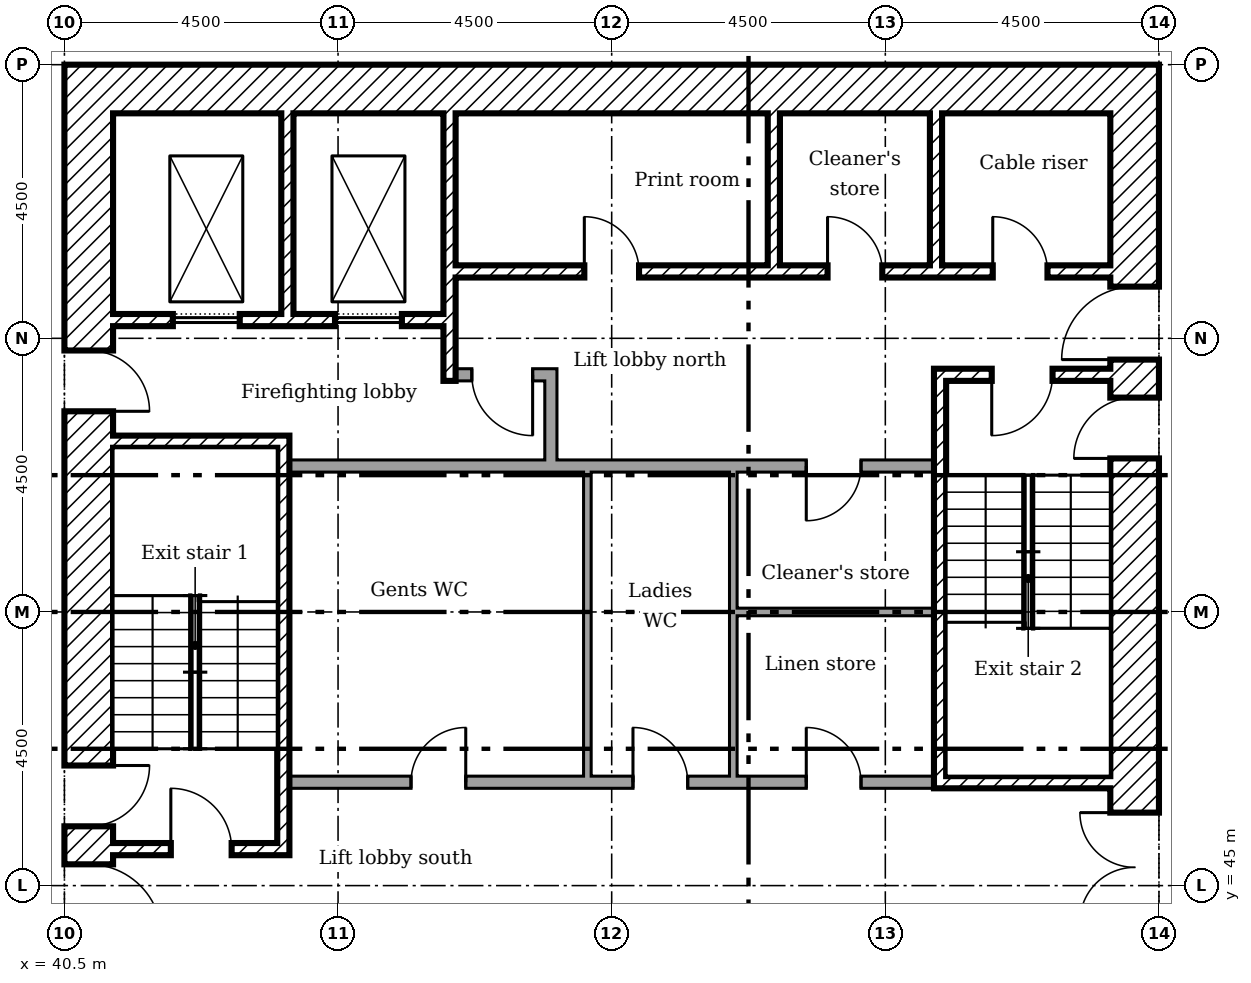
"""IFC4 building model, lengths in metres.
Left out: names, types, materials, properties, quantities, classifications, styles, units other than length and angle.
Written with IfcOpenShell. Run it as: python <this file> out.ifc"""

import sys

from ifc_helpers import new_model, si_unit, direction, frame, frame_2d, origin, place, context, subcontext, project, spatial, rectangle, extrude, element, fill, save


model = new_model("IFC4")
c1 = context("Model", 3, precision=1e-05, world=origin(), true_north=direction((0.0, 1.0)))
c2 = subcontext(c1, "Body", "Model", "MODEL_VIEW")
j1 = project(units=[si_unit("LENGTHUNIT", "METRE"), si_unit("PLANEANGLEUNIT", "RADIAN")], contexts=[c1])
p1 = place(None, origin())
s1 = spatial("IfcSite", under=j1, at=p1, CompositionType="ELEMENT")
p2 = place(p1, origin())
s2 = spatial("IfcBuilding", under=s1, at=p2, CompositionType="ELEMENT")
p3 = place(p2, frame((0.0, 0.0, 58.2)))
s3 = spatial("IfcBuildingStorey", under=s2, at=p3, CompositionType="ELEMENT", Elevation=58.2)
p4 = place(p3, frame((58.1, 40.5, 0.0), z_axis=(0.0, 0.0, 1.0), x_axis=(0.0, 1.0, 0.0)))
e1 = element("IfcWall", 1, at=p4, inside=s3, PredefinedType="SHEAR", context=c2, shape_type="SweptSolid", body=[
    extrude(rectangle(XDim=18.0, YDim=0.8, at=frame_2d((9.0, 0.0))), origin(), (0.0, 0.0, 1.0), 3.35),
])
p5 = place(p4, frame((13.15, 0.0, 0.0)))
e2 = element("IfcOpeningElement", 2, at=p5, cuts=e1, PredefinedType="OPENING", context=c2, shape_type="SweptSolid", body=[
    extrude(rectangle(XDim=1.2, YDim=2.1, at=frame_2d((0.6, 1.05))), frame((0.0, 0.41, 0.0), z_axis=(0.0, -1.0, 0.0), x_axis=(1.0, 0.0, 0.0)), (0.0, 0.0, 1.0), 0.82),
])
p6 = place(p4, frame((3.9, 0.0, 0.0)))
e3 = element("IfcOpeningElement", 3, at=p6, cuts=e1, PredefinedType="OPENING", context=c2, shape_type="SweptSolid", body=[
    extrude(rectangle(XDim=1.8, YDim=2.1, at=frame_2d((0.9, 1.05))), frame((0.0, 0.41, 0.0), z_axis=(0.0, -1.0, 0.0), x_axis=(1.0, 0.0, 0.0)), (0.0, 0.0, 1.0), 0.82),
])
p7 = place(p4, frame((11.525, 0.0, 0.0)))
e4 = element("IfcOpeningElement", 4, at=p7, cuts=e1, PredefinedType="OPENING", context=c2, shape_type="SweptSolid", body=[
    extrude(rectangle(XDim=1.0, YDim=2.1, at=frame_2d((0.5, 1.05))), frame((0.0, 0.41, 0.0), z_axis=(0.0, -1.0, 0.0), x_axis=(1.0, 0.0, 0.0)), (0.0, 0.0, 1.0), 0.82),
])
p8 = place(p3, frame((41.3, 58.1, 0.0)))
e5 = element("IfcWall", 5, at=p8, inside=s3, PredefinedType="SHEAR", context=c2, shape_type="SweptSolid", body=[
    extrude(rectangle(XDim=16.4, YDim=0.8, at=frame_2d((8.2, 0.0))), origin(), (0.0, 0.0, 1.0), 3.35),
])
p9 = place(p3, frame((40.9, 40.5, 0.0), z_axis=(0.0, 0.0, 1.0), x_axis=(0.0, 1.0, 0.0)))
e6 = element("IfcWall", 6, at=p9, inside=s3, PredefinedType="SHEAR", context=c2, shape_type="SweptSolid", body=[
    extrude(rectangle(XDim=18.0, YDim=0.8, at=frame_2d((9.0, 0.0))), origin(), (0.0, 0.0, 1.0), 3.35),
])
p10 = place(p9, frame((3.65, 0.0, 0.0)))
e7 = element("IfcOpeningElement", 7, at=p10, cuts=e6, PredefinedType="OPENING", context=c2, shape_type="SweptSolid", body=[
    extrude(rectangle(XDim=1.2, YDim=2.1, at=frame_2d((0.6, 1.05))), frame((0.0, 0.41, 0.0), z_axis=(0.0, -1.0, 0.0), x_axis=(1.0, 0.0, 0.0)), (0.0, 0.0, 1.0), 0.82),
])
p11 = place(p9, frame((5.475, 0.0, 0.0)))
e8 = element("IfcOpeningElement", 8, at=p11, cuts=e6, PredefinedType="OPENING", context=c2, shape_type="SweptSolid", body=[
    extrude(rectangle(XDim=1.0, YDim=2.1, at=frame_2d((0.5, 1.05))), frame((0.0, 0.41, 0.0), z_axis=(0.0, -1.0, 0.0), x_axis=(1.0, 0.0, 0.0)), (0.0, 0.0, 1.0), 0.82),
])
p12 = place(p9, frame((12.3, 0.0, 0.0)))
e9 = element("IfcOpeningElement", 9, at=p12, cuts=e6, PredefinedType="OPENING", context=c2, shape_type="SweptSolid", body=[
    extrude(rectangle(XDim=1.0, YDim=2.1, at=frame_2d((0.5, 1.05))), frame((0.0, 0.41, 0.0), z_axis=(0.0, -1.0, 0.0), x_axis=(1.0, 0.0, 0.0)), (0.0, 0.0, 1.0), 0.82),
])
p13 = place(p3, frame((44.167, 57.7, 0.0), z_axis=(0.0, 0.0, 1.0), x_axis=(0.0, -1.0, 0.0)))
e10 = element("IfcWall", 10, at=p13, inside=s3, PredefinedType="SHEAR", context=c2, shape_type="SweptSolid", body=[
    extrude(rectangle(XDim=3.3, YDim=0.2, at=frame_2d((1.65, 0.0))), origin(), (0.0, 0.0, 1.0), 3.35),
])
p14 = place(p3, frame((46.833, 57.7, 0.0), z_axis=(0.0, 0.0, 1.0), x_axis=(0.0, -1.0, 0.0)))
e11 = element("IfcWall", 11, at=p14, inside=s3, PredefinedType="SHEAR", context=c2, shape_type="SweptSolid", body=[
    extrude(rectangle(XDim=4.4, YDim=0.2, at=frame_2d((2.2, 0.0))), origin(), (0.0, 0.0, 1.0), 3.35),
])
for number, where, z_axis, x_axis in (
    (12, (52.167, 57.7, 0.0), (0.0, 0.0, 1.0), (0.0, -1.0, 0.0)),
    (13, (54.833, 57.7, 0.0), (0.0, 0.0, 1.0), (0.0, -1.0, 0.0)),
):
    element("IfcWall", number, at=place(p3, frame(where, z_axis=z_axis, x_axis=x_axis)), inside=s3, PredefinedType="SHEAR", context=c2, shape_type="SweptSolid", body=[
        extrude(rectangle(XDim=2.5, YDim=0.2, at=frame_2d((1.25, 0.0))), origin(), (0.0, 0.0, 1.0), 3.35),
    ])
p15 = place(p3, frame((48.5, 51.9, 0.0), z_axis=(0.0, 0.0, 1.0), x_axis=(0.0, 1.0, 0.0)))
e14 = element("IfcWall", 14, at=p15, inside=s3, PredefinedType="PARTITIONING", context=c2, shape_type="SweptSolid", body=[
    extrude(rectangle(XDim=1.6, YDim=0.2, at=frame_2d((0.8, 0.0))), origin(), (0.0, 0.0, 1.0), 3.35),
])
p16 = place(p3, frame((46.933, 53.4, 0.0)))
e15 = element("IfcWall", 15, at=p16, inside=s3, PredefinedType="PARTITIONING", context=c2, shape_type="SweptSolid", body=[
    extrude(rectangle(XDim=1.467, YDim=0.2, at=frame_2d((0.733, 0.0))), origin(), (0.0, 0.0, 1.0), 3.35),
])
p17 = place(p16, frame((0.267, 0.0, 0.0)))
e16 = element("IfcOpeningElement", 16, at=p17, cuts=e15, PredefinedType="OPENING", context=c2, shape_type="SweptSolid", body=[
    extrude(rectangle(XDim=1.0, YDim=2.1, at=frame_2d((0.5, 1.05))), frame((0.0, 0.11, 0.0), z_axis=(0.0, -1.0, 0.0), x_axis=(1.0, 0.0, 0.0)), (0.0, 0.0, 1.0), 0.22),
])
p18 = place(p3, frame((46.933, 55.1, 0.0)))
e17 = element("IfcWall", 17, at=p18, inside=s3, PredefinedType="SHEAR", context=c2, shape_type="SweptSolid", body=[
    extrude(rectangle(XDim=10.767, YDim=0.2, at=frame_2d((5.383, 0.0))), origin(), (0.0, 0.0, 1.0), 3.35),
])
p19 = place(p18, frame((8.833, 0.0, 0.0)))
e18 = element("IfcOpeningElement", 18, at=p19, cuts=e17, PredefinedType="OPENING", context=c2, shape_type="SweptSolid", body=[
    extrude(rectangle(XDim=0.9, YDim=2.1, at=frame_2d((0.45, 1.05))), frame((0.0, 0.11, 0.0), z_axis=(0.0, -1.0, 0.0), x_axis=(1.0, 0.0, 0.0)), (0.0, 0.0, 1.0), 0.22),
])
p20 = place(p18, frame((2.117, 0.0, 0.0)))
e19 = element("IfcOpeningElement", 19, at=p20, cuts=e17, PredefinedType="OPENING", context=c2, shape_type="SweptSolid", body=[
    extrude(rectangle(XDim=0.9, YDim=2.1, at=frame_2d((0.45, 1.05))), frame((0.0, 0.11, 0.0), z_axis=(0.0, -1.0, 0.0), x_axis=(1.0, 0.0, 0.0)), (0.0, 0.0, 1.0), 0.22),
])
p21 = place(p18, frame((6.117, 0.0, 0.0)))
e20 = element("IfcOpeningElement", 20, at=p21, cuts=e17, PredefinedType="OPENING", context=c2, shape_type="SweptSolid", body=[
    extrude(rectangle(XDim=0.9, YDim=2.1, at=frame_2d((0.45, 1.05))), frame((0.0, 0.11, 0.0), z_axis=(0.0, -1.0, 0.0), x_axis=(1.0, 0.0, 0.0)), (0.0, 0.0, 1.0), 0.22),
])
p22 = place(p3, frame((41.3, 54.3, 0.0)))
e21 = element("IfcWall", 21, at=p22, inside=s3, PredefinedType="SHEAR", context=c2, shape_type="SweptSolid", body=[
    extrude(rectangle(XDim=5.433, YDim=0.2, at=frame_2d((2.717, 0.0))), origin(), (0.0, 0.0, 1.0), 3.35),
])
p23 = place(p22, frame((0.983, 0.0, 0.0)))
e22 = element("IfcOpeningElement", 22, at=p23, cuts=e21, PredefinedType="OPENING", context=c2, shape_type="SweptSolid", body=[
    extrude(rectangle(XDim=1.1, YDim=2.1, at=frame_2d((0.55, 1.05))), frame((0.0, 0.11, 0.0), z_axis=(0.0, -1.0, 0.0), x_axis=(1.0, 0.0, 0.0)), (0.0, 0.0, 1.0), 0.22),
])
p24 = place(p22, frame((3.65, 0.0, 0.0)))
e23 = element("IfcOpeningElement", 23, at=p24, cuts=e21, PredefinedType="OPENING", context=c2, shape_type="SweptSolid", body=[
    extrude(rectangle(XDim=1.1, YDim=2.1, at=frame_2d((0.55, 1.05))), frame((0.0, 0.11, 0.0), z_axis=(0.0, -1.0, 0.0), x_axis=(1.0, 0.0, 0.0)), (0.0, 0.0, 1.0), 0.22),
])
p25 = place(p3, frame((44.1, 45.5, 0.0), z_axis=(0.0, 0.0, 1.0), x_axis=(0.0, 1.0, 0.0)))
e24 = element("IfcWall", 24, at=p25, inside=s3, PredefinedType="SHEAR", context=c2, shape_type="SweptSolid", body=[
    extrude(rectangle(XDim=6.9, YDim=0.2, at=frame_2d((3.45, 0.0))), origin(), (0.0, 0.0, 1.0), 3.35),
])
p26 = place(p3, frame((41.3, 52.3, 0.0)))
e25 = element("IfcWall", 25, at=p26, inside=s3, PredefinedType="SHEAR", context=c2, shape_type="SweptSolid", body=[
    extrude(rectangle(XDim=2.7, YDim=0.2, at=frame_2d((1.35, 0.0))), origin(), (0.0, 0.0, 1.0), 3.35),
])
p27 = place(p3, frame((41.3, 45.6, 0.0)))
e26 = element("IfcWall", 26, at=p27, inside=s3, PredefinedType="SHEAR", context=c2, shape_type="SweptSolid", body=[
    extrude(rectangle(XDim=2.7, YDim=0.2, at=frame_2d((1.35, 0.0))), origin(), (0.0, 0.0, 1.0), 3.35),
])
p28 = place(p27, frame((0.95, 0.0, 0.0)))
e27 = element("IfcOpeningElement", 27, at=p28, cuts=e26, PredefinedType="OPENING", context=c2, shape_type="SweptSolid", body=[
    extrude(rectangle(XDim=1.0, YDim=2.1, at=frame_2d((0.5, 1.05))), frame((0.0, 0.11, 0.0), z_axis=(0.0, -1.0, 0.0), x_axis=(1.0, 0.0, 0.0)), (0.0, 0.0, 1.0), 0.22),
])
p29 = place(p3, frame((54.8, 53.4, 0.0)))
e28 = element("IfcWall", 28, at=p29, inside=s3, PredefinedType="SHEAR", context=c2, shape_type="SweptSolid", body=[
    extrude(rectangle(XDim=2.9, YDim=0.2, at=frame_2d((1.45, 0.0))), origin(), (0.0, 0.0, 1.0), 3.35),
])
p30 = place(p29, frame((0.95, 0.0, 0.0)))
e29 = element("IfcOpeningElement", 29, at=p30, cuts=e28, PredefinedType="OPENING", context=c2, shape_type="SweptSolid", body=[
    extrude(rectangle(XDim=1.0, YDim=2.1, at=frame_2d((0.5, 1.05))), frame((0.0, 0.11, 0.0), z_axis=(0.0, -1.0, 0.0), x_axis=(1.0, 0.0, 0.0)), (0.0, 0.0, 1.0), 0.22),
])
p31 = place(p3, frame((54.8, 46.7, 0.0)))
e30 = element("IfcWall", 30, at=p31, inside=s3, PredefinedType="SHEAR", context=c2, shape_type="SweptSolid", body=[
    extrude(rectangle(XDim=2.9, YDim=0.2, at=frame_2d((1.45, 0.0))), origin(), (0.0, 0.0, 1.0), 3.35),
])
p32 = place(p3, frame((54.9, 46.8, 0.0), z_axis=(0.0, 0.0, 1.0), x_axis=(0.0, 1.0, 0.0)))
e31 = element("IfcWall", 31, at=p32, inside=s3, PredefinedType="SHEAR", context=c2, shape_type="SweptSolid", body=[
    extrude(rectangle(XDim=6.5, YDim=0.2, at=frame_2d((3.25, 0.0))), origin(), (0.0, 0.0, 1.0), 3.35),
])
p33 = place(p3, frame((44.2, 51.9, 0.0)))
e32 = element("IfcWall", 32, at=p33, inside=s3, PredefinedType="PARTITIONING", context=c2, shape_type="SweptSolid", body=[
    extrude(rectangle(XDim=10.6, YDim=0.2, at=frame_2d((5.3, 0.0))), origin(), (0.0, 0.0, 1.0), 3.35),
])
p34 = place(p33, frame((8.5, 0.0, 0.0)))
e33 = element("IfcOpeningElement", 33, at=p34, cuts=e32, PredefinedType="OPENING", context=c2, shape_type="SweptSolid", body=[
    extrude(rectangle(XDim=0.9, YDim=2.1, at=frame_2d((0.45, 1.05))), frame((0.0, 0.11, 0.0), z_axis=(0.0, -1.0, 0.0), x_axis=(1.0, 0.0, 0.0)), (0.0, 0.0, 1.0), 0.22),
])
p35 = place(p3, frame((44.2, 46.7, 0.0)))
e34 = element("IfcWall", 34, at=p35, inside=s3, PredefinedType="PARTITIONING", context=c2, shape_type="SweptSolid", body=[
    extrude(rectangle(XDim=10.6, YDim=0.2, at=frame_2d((5.3, 0.0))), origin(), (0.0, 0.0, 1.0), 3.35),
])
p36 = place(p35, frame((2.0, 0.0, 0.0)))
e35 = element("IfcOpeningElement", 35, at=p36, cuts=e34, PredefinedType="OPENING", context=c2, shape_type="SweptSolid", body=[
    extrude(rectangle(XDim=0.9, YDim=2.1, at=frame_2d((0.45, 1.05))), frame((0.0, 0.11, 0.0), z_axis=(0.0, -1.0, 0.0), x_axis=(1.0, 0.0, 0.0)), (0.0, 0.0, 1.0), 0.22),
])
p37 = place(p35, frame((5.65, 0.0, 0.0)))
e36 = element("IfcOpeningElement", 36, at=p37, cuts=e34, PredefinedType="OPENING", context=c2, shape_type="SweptSolid", body=[
    extrude(rectangle(XDim=0.9, YDim=2.1, at=frame_2d((0.45, 1.05))), frame((0.0, 0.11, 0.0), z_axis=(0.0, -1.0, 0.0), x_axis=(1.0, 0.0, 0.0)), (0.0, 0.0, 1.0), 0.22),
])
p38 = place(p35, frame((8.5, 0.0, 0.0)))
e37 = element("IfcOpeningElement", 37, at=p38, cuts=e34, PredefinedType="OPENING", context=c2, shape_type="SweptSolid", body=[
    extrude(rectangle(XDim=0.9, YDim=2.1, at=frame_2d((0.45, 1.05))), frame((0.0, 0.11, 0.0), z_axis=(0.0, -1.0, 0.0), x_axis=(1.0, 0.0, 0.0)), (0.0, 0.0, 1.0), 0.22),
])
p39 = place(p3, frame((49.1, 46.8, 0.0), z_axis=(0.0, 0.0, 1.0), x_axis=(0.0, 1.0, 0.0)))
e38 = element("IfcWall", 38, at=p39, inside=s3, PredefinedType="PARTITIONING", context=c2, shape_type="SweptSolid", body=[
    extrude(rectangle(XDim=5.0, YDim=0.125, at=frame_2d((2.5, 0.0))), origin(), (0.0, 0.0, 1.0), 3.35),
])
p40 = place(p3, frame((51.5, 46.8, 0.0), z_axis=(0.0, 0.0, 1.0), x_axis=(0.0, 1.0, 0.0)))
e39 = element("IfcWall", 39, at=p40, inside=s3, PredefinedType="PARTITIONING", context=c2, shape_type="SweptSolid", body=[
    extrude(rectangle(XDim=2.762, YDim=0.125, at=frame_2d((1.381, 0.0))), origin(), (0.0, 0.0, 1.0), 3.35),
])
p41 = place(p3, frame((51.562, 49.5, 0.0)))
e40 = element("IfcWall", 40, at=p41, inside=s3, PredefinedType="PARTITIONING", context=c2, shape_type="SweptSolid", body=[
    extrude(rectangle(XDim=3.238, YDim=0.125, at=frame_2d((1.619, 0.0))), origin(), (0.0, 0.0, 1.0), 3.35),
])
p42 = place(p3, frame((51.5, 49.5, 0.0), z_axis=(0.0, 0.0, 1.0), x_axis=(0.0, 1.0, 0.0)))
e41 = element("IfcWall", 41, at=p42, inside=s3, PredefinedType="PARTITIONING", context=c2, shape_type="SweptSolid", body=[
    extrude(rectangle(XDim=2.3, YDim=0.125, at=frame_2d((1.15, 0.0))), origin(), (0.0, 0.0, 1.0), 3.35),
])
p43 = place(p5, origin())
e42 = element("IfcDoor", 42, at=p43, inside=s3, OperationType="SINGLE_SWING_RIGHT", PredefinedType="DOOR", context=c2, shape_type="SweptSolid", body=[
    extrude(rectangle(XDim=1.2, YDim=2.1, at=frame_2d((0.6, 1.05))), frame((0.0, 0.025, 0.0), z_axis=(0.0, -1.0, 0.0), x_axis=(1.0, 0.0, 0.0)), (0.0, 0.0, 1.0), 0.05),
])
fill(e2, e42)
p44 = place(p6, origin())
e43 = element("IfcDoor", 43, at=p44, inside=s3, OperationType="DOUBLE_DOOR_SINGLE_SWING", PredefinedType="DOOR", context=c2, shape_type="SweptSolid", body=[
    extrude(rectangle(XDim=1.8, YDim=2.1, at=frame_2d((0.9, 1.05))), frame((0.0, 0.025, 0.0), z_axis=(0.0, -1.0, 0.0), x_axis=(1.0, 0.0, 0.0)), (0.0, 0.0, 1.0), 0.05),
])
fill(e3, e43)
p45 = place(p10, frame((1.2, 0.0, 0.0), x_axis=(-1.0, 0.0, 0.0)))
e44 = element("IfcDoor", 44, at=p45, inside=s3, OperationType="SINGLE_SWING_LEFT", PredefinedType="DOOR", context=c2, shape_type="SweptSolid", body=[
    extrude(rectangle(XDim=1.2, YDim=2.1, at=frame_2d((0.6, 1.05))), frame((0.0, 0.025, 0.0), z_axis=(0.0, -1.0, 0.0), x_axis=(1.0, 0.0, 0.0)), (0.0, 0.0, 1.0), 0.05),
])
fill(e7, e44)
p46 = place(p28, origin())
e45 = element("IfcDoor", 45, at=p46, inside=s3, OperationType="SINGLE_SWING_RIGHT", PredefinedType="DOOR", context=c2, shape_type="SweptSolid", body=[
    extrude(rectangle(XDim=1.0, YDim=2.1, at=frame_2d((0.5, 1.05))), frame((0.0, 0.025, 0.0), z_axis=(0.0, -1.0, 0.0), x_axis=(1.0, 0.0, 0.0)), (0.0, 0.0, 1.0), 0.05),
])
fill(e27, e45)
p47 = place(p11, frame((1.0, 0.0, 0.0), x_axis=(-1.0, 0.0, 0.0)))
e46 = element("IfcDoor", 46, at=p47, inside=s3, OperationType="SINGLE_SWING_RIGHT", PredefinedType="DOOR", context=c2, shape_type="SweptSolid", body=[
    extrude(rectangle(XDim=1.0, YDim=2.1, at=frame_2d((0.5, 1.05))), frame((0.0, 0.025, 0.0), z_axis=(0.0, -1.0, 0.0), x_axis=(1.0, 0.0, 0.0)), (0.0, 0.0, 1.0), 0.05),
])
fill(e8, e46)
p48 = place(p30, frame((1.0, 0.0, 0.0), x_axis=(-1.0, 0.0, 0.0)))
e47 = element("IfcDoor", 47, at=p48, inside=s3, OperationType="SINGLE_SWING_LEFT", PredefinedType="DOOR", context=c2, shape_type="SweptSolid", body=[
    extrude(rectangle(XDim=1.0, YDim=2.1, at=frame_2d((0.5, 1.05))), frame((0.0, 0.025, 0.0), z_axis=(0.0, -1.0, 0.0), x_axis=(1.0, 0.0, 0.0)), (0.0, 0.0, 1.0), 0.05),
])
fill(e29, e47)
p49 = place(p7, origin())
e48 = element("IfcDoor", 48, at=p49, inside=s3, OperationType="SINGLE_SWING_RIGHT", PredefinedType="DOOR", context=c2, shape_type="SweptSolid", body=[
    extrude(rectangle(XDim=1.0, YDim=2.1, at=frame_2d((0.5, 1.05))), frame((0.0, 0.025, 0.0), z_axis=(0.0, -1.0, 0.0), x_axis=(1.0, 0.0, 0.0)), (0.0, 0.0, 1.0), 0.05),
])
fill(e4, e48)
p50 = place(p17, frame((1.0, 0.0, 0.0), x_axis=(-1.0, 0.0, 0.0)))
e49 = element("IfcDoor", 49, at=p50, inside=s3, OperationType="SINGLE_SWING_RIGHT", PredefinedType="DOOR", context=c2, shape_type="SweptSolid", body=[
    extrude(rectangle(XDim=1.0, YDim=2.1, at=frame_2d((0.5, 1.05))), frame((0.0, 0.025, 0.0), z_axis=(0.0, -1.0, 0.0), x_axis=(1.0, 0.0, 0.0)), (0.0, 0.0, 1.0), 0.05),
])
fill(e16, e49)
p51 = place(p12, frame((1.0, 0.0, 0.0), x_axis=(-1.0, 0.0, 0.0)))
e50 = element("IfcDoor", 50, at=p51, inside=s3, OperationType="SINGLE_SWING_LEFT", PredefinedType="DOOR", context=c2, shape_type="SweptSolid", body=[
    extrude(rectangle(XDim=1.0, YDim=2.1, at=frame_2d((0.5, 1.05))), frame((0.0, 0.025, 0.0), z_axis=(0.0, -1.0, 0.0), x_axis=(1.0, 0.0, 0.0)), (0.0, 0.0, 1.0), 0.05),
])
fill(e9, e50)
p52 = place(p19, origin())
e51 = element("IfcDoor", 51, at=p52, inside=s3, OperationType="SINGLE_SWING_RIGHT", PredefinedType="DOOR", context=c2, shape_type="SweptSolid", body=[
    extrude(rectangle(XDim=0.9, YDim=2.1, at=frame_2d((0.45, 1.05))), frame((0.0, 0.025, 0.0), z_axis=(0.0, -1.0, 0.0), x_axis=(1.0, 0.0, 0.0)), (0.0, 0.0, 1.0), 0.05),
])
fill(e18, e51)
p53 = place(p20, origin())
e52 = element("IfcDoor", 52, at=p53, inside=s3, OperationType="SINGLE_SWING_RIGHT", PredefinedType="DOOR", context=c2, shape_type="SweptSolid", body=[
    extrude(rectangle(XDim=0.9, YDim=2.1, at=frame_2d((0.45, 1.05))), frame((0.0, 0.025, 0.0), z_axis=(0.0, -1.0, 0.0), x_axis=(1.0, 0.0, 0.0)), (0.0, 0.0, 1.0), 0.05),
])
fill(e19, e52)
p54 = place(p21, origin())
e53 = element("IfcDoor", 53, at=p54, inside=s3, OperationType="SINGLE_SWING_RIGHT", PredefinedType="DOOR", context=c2, shape_type="SweptSolid", body=[
    extrude(rectangle(XDim=0.9, YDim=2.1, at=frame_2d((0.45, 1.05))), frame((0.0, 0.025, 0.0), z_axis=(0.0, -1.0, 0.0), x_axis=(1.0, 0.0, 0.0)), (0.0, 0.0, 1.0), 0.05),
])
fill(e20, e53)
p55 = place(p36, origin())
e54 = element("IfcDoor", 54, at=p55, inside=s3, OperationType="SINGLE_SWING_LEFT", PredefinedType="DOOR", context=c2, shape_type="SweptSolid", body=[
    extrude(rectangle(XDim=0.9, YDim=2.1, at=frame_2d((0.45, 1.05))), frame((0.0, 0.025, 0.0), z_axis=(0.0, -1.0, 0.0), x_axis=(1.0, 0.0, 0.0)), (0.0, 0.0, 1.0), 0.05),
])
fill(e35, e54)
p56 = place(p37, origin())
e55 = element("IfcDoor", 55, at=p56, inside=s3, OperationType="SINGLE_SWING_RIGHT", PredefinedType="DOOR", context=c2, shape_type="SweptSolid", body=[
    extrude(rectangle(XDim=0.9, YDim=2.1, at=frame_2d((0.45, 1.05))), frame((0.0, 0.025, 0.0), z_axis=(0.0, -1.0, 0.0), x_axis=(1.0, 0.0, 0.0)), (0.0, 0.0, 1.0), 0.05),
])
fill(e36, e55)
p57 = place(p34, frame((0.9, 0.0, 0.0), x_axis=(-1.0, 0.0, 0.0)))
e56 = element("IfcDoor", 56, at=p57, inside=s3, OperationType="SINGLE_SWING_LEFT", PredefinedType="DOOR", context=c2, shape_type="SweptSolid", body=[
    extrude(rectangle(XDim=0.9, YDim=2.1, at=frame_2d((0.45, 1.05))), frame((0.0, 0.025, 0.0), z_axis=(0.0, -1.0, 0.0), x_axis=(1.0, 0.0, 0.0)), (0.0, 0.0, 1.0), 0.05),
])
fill(e33, e56)
p58 = place(p38, origin())
e57 = element("IfcDoor", 57, at=p58, inside=s3, OperationType="SINGLE_SWING_RIGHT", PredefinedType="DOOR", context=c2, shape_type="SweptSolid", body=[
    extrude(rectangle(XDim=0.9, YDim=2.1, at=frame_2d((0.45, 1.05))), frame((0.0, 0.025, 0.0), z_axis=(0.0, -1.0, 0.0), x_axis=(1.0, 0.0, 0.0)), (0.0, 0.0, 1.0), 0.05),
])
fill(e37, e57)
p59 = place(p23, origin())
e58 = element("IfcDoor", 58, at=p59, inside=s3, OperationType="SLIDING_TO_LEFT", PredefinedType="DOOR", context=c2, shape_type="SweptSolid", body=[
    extrude(rectangle(XDim=1.1, YDim=2.1, at=frame_2d((0.55, 1.05))), frame((0.0, 0.025, 0.0), z_axis=(0.0, -1.0, 0.0), x_axis=(1.0, 0.0, 0.0)), (0.0, 0.0, 1.0), 0.05),
])
fill(e22, e58)
p60 = place(p24, origin())
e59 = element("IfcDoor", 59, at=p60, inside=s3, OperationType="SLIDING_TO_LEFT", PredefinedType="DOOR", context=c2, shape_type="SweptSolid", body=[
    extrude(rectangle(XDim=1.1, YDim=2.1, at=frame_2d((0.55, 1.05))), frame((0.0, 0.025, 0.0), z_axis=(0.0, -1.0, 0.0), x_axis=(1.0, 0.0, 0.0)), (0.0, 0.0, 1.0), 0.05),
])
fill(e23, e59)
save(model, sys.argv[1])
